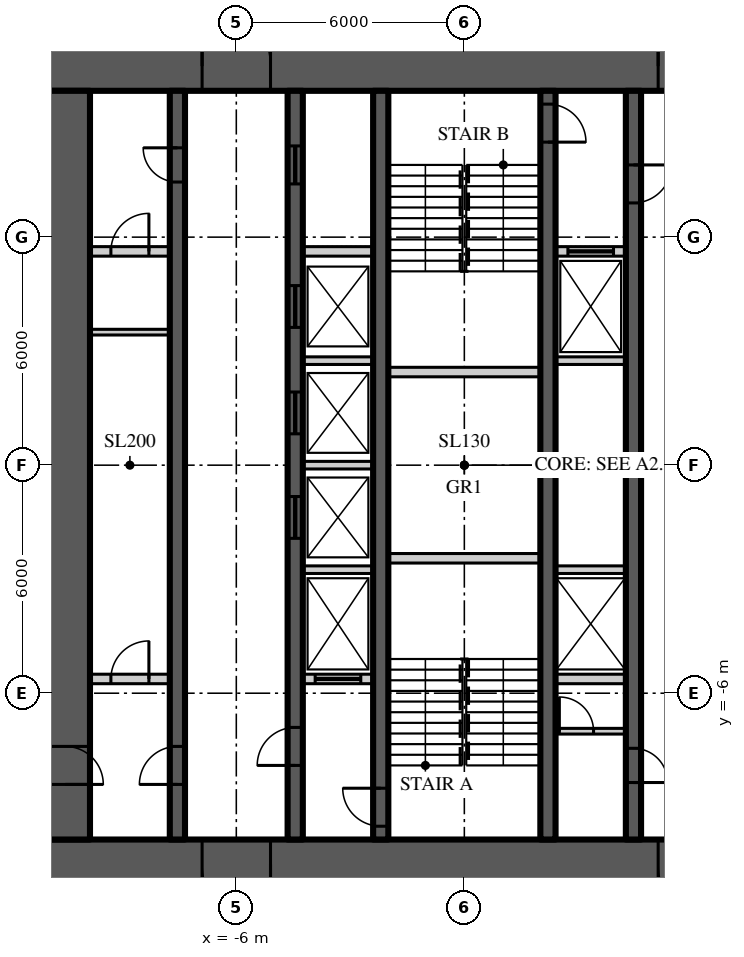
"""IFC4 building model, lengths in metres.
Left out: names, types, materials, properties, quantities, classifications, styles, units other than length and angle.
Written with IfcOpenShell. Run it as: python <this file> out.ifc"""

import sys

from ifc_helpers import new_model, si_unit, direction, frame, frame_2d, origin, place, context, subcontext, project, spatial, rectangle, extrude, element, fill, save


model = new_model("IFC4")
c1 = context("Model", 3, precision=1e-05, world=origin(), true_north=direction((0.0, 1.0)))
c2 = subcontext(c1, "Body", "Model", "MODEL_VIEW")
j1 = project(units=[si_unit("LENGTHUNIT", "METRE"), si_unit("PLANEANGLEUNIT", "RADIAN")], contexts=[c1])
p1 = place(None, origin())
s1 = spatial("IfcSite", under=j1, at=p1, CompositionType="ELEMENT")
p2 = place(p1, origin())
s2 = spatial("IfcBuilding", under=s1, at=p2, CompositionType="ELEMENT")
p3 = place(p2, frame((0.0, 0.0, 171.0)))
s3 = spatial("IfcBuildingStorey", under=s2, at=p3, CompositionType="ELEMENT", Elevation=171.0)
p4 = place(p3, frame((-11.15, 10.5, 0.0), z_axis=(0.0, 0.0, 1.0), x_axis=(1.0, 0.0, 0.0)))
e1 = element("IfcWall", 1, at=p4, inside=s3, PredefinedType="SHEAR", context=c2, shape_type="SweptSolid", body=[
    extrude(rectangle(XDim=22.3, YDim=1.3, at=frame_2d((11.15, 0.0))), origin(), (0.0, 0.0, 1.0), 3.9),
])
p5 = place(p4, frame((4.25, 0.0, 0.0)))
e2 = element("IfcOpeningElement", 2, at=p5, cuts=e1, PredefinedType="OPENING", context=c2, shape_type="SweptSolid", body=[
    extrude(rectangle(XDim=1.8, YDim=2.2, at=frame_2d((0.9, 1.1))), frame((0.0, 0.66, 0.0), z_axis=(0.0, -1.0, 0.0), x_axis=(1.0, 0.0, 0.0)), (0.0, 0.0, 1.0), 1.32),
])
p6 = place(p4, frame((16.25, 0.0, 0.0)))
e3 = element("IfcOpeningElement", 3, at=p6, cuts=e1, PredefinedType="OPENING", context=c2, shape_type="SweptSolid", body=[
    extrude(rectangle(XDim=1.8, YDim=2.2, at=frame_2d((0.9, 1.1))), frame((0.0, 0.66, 0.0), z_axis=(0.0, -1.0, 0.0), x_axis=(1.0, 0.0, 0.0)), (0.0, 0.0, 1.0), 1.32),
])
p7 = place(p3, frame((11.15, -10.5, 0.0), z_axis=(0.0, 0.0, 1.0), x_axis=(-1.0, 0.0, 0.0)))
e4 = element("IfcWall", 4, at=p7, inside=s3, PredefinedType="SHEAR", context=c2, shape_type="SweptSolid", body=[
    extrude(rectangle(XDim=22.3, YDim=1.3, at=frame_2d((11.15, 0.0))), origin(), (0.0, 0.0, 1.0), 3.9),
])
p8 = place(p7, frame((16.25, 0.0, 0.0)))
e5 = element("IfcOpeningElement", 5, at=p8, cuts=e4, PredefinedType="OPENING", context=c2, shape_type="SweptSolid", body=[
    extrude(rectangle(XDim=1.8, YDim=2.2, at=frame_2d((0.9, 1.1))), frame((0.0, 0.66, 0.0), z_axis=(0.0, -1.0, 0.0), x_axis=(1.0, 0.0, 0.0)), (0.0, 0.0, 1.0), 1.32),
])
p9 = place(p7, frame((4.25, 0.0, 0.0)))
e6 = element("IfcOpeningElement", 6, at=p9, cuts=e4, PredefinedType="OPENING", context=c2, shape_type="SweptSolid", body=[
    extrude(rectangle(XDim=1.8, YDim=2.2, at=frame_2d((0.9, 1.1))), frame((0.0, 0.66, 0.0), z_axis=(0.0, -1.0, 0.0), x_axis=(1.0, 0.0, 0.0)), (0.0, 0.0, 1.0), 1.32),
])
p10 = place(p3, frame((-10.5, 9.85, 0.0), z_axis=(0.0, 0.0, 1.0), x_axis=(0.0, -1.0, 0.0)))
e7 = element("IfcWall", 7, at=p10, inside=s3, PredefinedType="SHEAR", context=c2, shape_type="SweptSolid", body=[
    extrude(rectangle(XDim=19.7, YDim=1.3, at=frame_2d((9.85, 0.0))), origin(), (0.0, 0.0, 1.0), 3.9),
])
p11 = place(p10, frame((17.25, 0.0, 0.0)))
e8 = element("IfcOpeningElement", 8, at=p11, cuts=e7, PredefinedType="OPENING", context=c2, shape_type="SweptSolid", body=[
    extrude(rectangle(XDim=1.0, YDim=2.2, at=frame_2d((0.5, 1.1))), frame((0.0, 0.66, 0.0), z_axis=(0.0, -1.0, 0.0), x_axis=(1.0, 0.0, 0.0)), (0.0, 0.0, 1.0), 1.32),
])
p12 = place(p3, frame((-7.55, -9.85, 0.0), z_axis=(0.0, 0.0, 1.0), x_axis=(0.0, 1.0, 0.0)))
e9 = element("IfcWall", 9, at=p12, inside=s3, PredefinedType="SHEAR", context=c2, shape_type="SweptSolid", body=[
    extrude(rectangle(XDim=19.7, YDim=0.4, at=frame_2d((9.85, 0.0))), origin(), (0.0, 0.0, 1.0), 3.9),
])
p13 = place(p12, frame((1.45, 0.0, 0.0)))
e10 = element("IfcOpeningElement", 10, at=p13, cuts=e9, PredefinedType="OPENING", context=c2, shape_type="SweptSolid", body=[
    extrude(rectangle(XDim=1.0, YDim=2.2, at=frame_2d((0.5, 1.1))), frame((0.0, 0.21, 0.0), z_axis=(0.0, -1.0, 0.0), x_axis=(1.0, 0.0, 0.0)), (0.0, 0.0, 1.0), 0.42),
])
p14 = place(p12, frame((17.3, 0.0, 0.0)))
e11 = element("IfcOpeningElement", 11, at=p14, cuts=e9, PredefinedType="OPENING", context=c2, shape_type="SweptSolid", body=[
    extrude(rectangle(XDim=0.9, YDim=2.1, at=frame_2d((0.45, 1.05))), frame((0.0, 0.21, 0.0), z_axis=(0.0, -1.0, 0.0), x_axis=(1.0, 0.0, 0.0)), (0.0, 0.0, 1.0), 0.42),
])
p15 = place(p3, frame((-4.45, -9.85, 0.0), z_axis=(0.0, 0.0, 1.0), x_axis=(0.0, 1.0, 0.0)))
e12 = element("IfcWall", 12, at=p15, inside=s3, PredefinedType="SHEAR", context=c2, shape_type="SweptSolid", body=[
    extrude(rectangle(XDim=19.7, YDim=0.4, at=frame_2d((9.85, 0.0))), origin(), (0.0, 0.0, 1.0), 3.9),
])
p16 = place(p15, frame((1.95, 0.0, 0.0)))
e13 = element("IfcOpeningElement", 13, at=p16, cuts=e12, PredefinedType="OPENING", context=c2, shape_type="SweptSolid", body=[
    extrude(rectangle(XDim=1.0, YDim=2.2, at=frame_2d((0.5, 1.1))), frame((0.0, 0.21, 0.0), z_axis=(0.0, -1.0, 0.0), x_axis=(1.0, 0.0, 0.0)), (0.0, 0.0, 1.0), 0.42),
])
p17 = place(p15, frame((17.25, 0.0, 0.0)))
e14 = element("IfcOpeningElement", 14, at=p17, cuts=e12, PredefinedType="OPENING", context=c2, shape_type="SweptSolid", body=[
    extrude(rectangle(XDim=1.0, YDim=2.1, at=frame_2d((0.5, 1.05))), frame((0.0, 0.21, 0.0), z_axis=(0.0, -1.0, 0.0), x_axis=(1.0, 0.0, 0.0)), (0.0, 0.0, 1.0), 0.42),
])
p18 = place(p15, frame((7.925, 0.0, 0.0)))
e15 = element("IfcOpeningElement", 15, at=p18, cuts=e12, PredefinedType="OPENING", context=c2, shape_type="SweptSolid", body=[
    extrude(rectangle(XDim=1.1, YDim=2.2, at=frame_2d((0.55, 1.1))), frame((0.0, 0.21, 0.0), z_axis=(0.0, -1.0, 0.0), x_axis=(1.0, 0.0, 0.0)), (0.0, 0.0, 1.0), 0.42),
])
p19 = place(p15, frame((10.675, 0.0, 0.0)))
e16 = element("IfcOpeningElement", 16, at=p19, cuts=e12, PredefinedType="OPENING", context=c2, shape_type="SweptSolid", body=[
    extrude(rectangle(XDim=1.1, YDim=2.2, at=frame_2d((0.55, 1.1))), frame((0.0, 0.21, 0.0), z_axis=(0.0, -1.0, 0.0), x_axis=(1.0, 0.0, 0.0)), (0.0, 0.0, 1.0), 0.42),
])
p20 = place(p15, frame((13.475, 0.0, 0.0)))
e17 = element("IfcOpeningElement", 17, at=p20, cuts=e12, PredefinedType="OPENING", context=c2, shape_type="SweptSolid", body=[
    extrude(rectangle(XDim=1.1, YDim=2.2, at=frame_2d((0.55, 1.1))), frame((0.0, 0.21, 0.0), z_axis=(0.0, -1.0, 0.0), x_axis=(1.0, 0.0, 0.0)), (0.0, 0.0, 1.0), 0.42),
])
p21 = place(p3, frame((4.45, 9.85, 0.0), z_axis=(0.0, 0.0, 1.0), x_axis=(0.0, -1.0, 0.0)))
e18 = element("IfcWall", 18, at=p21, inside=s3, PredefinedType="SHEAR", context=c2, shape_type="SweptSolid", body=[
    extrude(rectangle(XDim=19.7, YDim=0.4, at=frame_2d((9.85, 0.0))), origin(), (0.0, 0.0, 1.0), 3.9),
])
p22 = place(p21, frame((1.95, 0.0, 0.0)))
e19 = element("IfcOpeningElement", 19, at=p22, cuts=e18, PredefinedType="OPENING", context=c2, shape_type="SweptSolid", body=[
    extrude(rectangle(XDim=1.0, YDim=2.2, at=frame_2d((0.5, 1.1))), frame((0.0, 0.21, 0.0), z_axis=(0.0, -1.0, 0.0), x_axis=(1.0, 0.0, 0.0)), (0.0, 0.0, 1.0), 0.42),
])
p23 = place(p21, frame((17.3, 0.0, 0.0)))
e20 = element("IfcOpeningElement", 20, at=p23, cuts=e18, PredefinedType="OPENING", context=c2, shape_type="SweptSolid", body=[
    extrude(rectangle(XDim=0.9, YDim=2.1, at=frame_2d((0.45, 1.05))), frame((0.0, 0.21, 0.0), z_axis=(0.0, -1.0, 0.0), x_axis=(1.0, 0.0, 0.0)), (0.0, 0.0, 1.0), 0.42),
])
p24 = place(p3, frame((-2.2, -9.85, 0.0), z_axis=(0.0, 0.0, 1.0), x_axis=(0.0, 1.0, 0.0)))
e21 = element("IfcWall", 21, at=p24, inside=s3, PredefinedType="SHEAR", context=c2, shape_type="SweptSolid", body=[
    extrude(rectangle(XDim=19.7, YDim=0.4, at=frame_2d((9.85, 0.0))), origin(), (0.0, 0.0, 1.0), 3.9),
])
p25 = place(p24, frame((0.35, 0.0, 0.0)))
e22 = element("IfcOpeningElement", 22, at=p25, cuts=e21, PredefinedType="OPENING", context=c2, shape_type="SweptSolid", body=[
    extrude(rectangle(XDim=1.0, YDim=2.2, at=frame_2d((0.5, 1.1))), frame((0.0, 0.21, 0.0), z_axis=(0.0, -1.0, 0.0), x_axis=(1.0, 0.0, 0.0)), (0.0, 0.0, 1.0), 0.42),
])
p26 = place(p3, frame((2.2, 9.85, 0.0), z_axis=(0.0, 0.0, 1.0), x_axis=(0.0, -1.0, 0.0)))
e23 = element("IfcWall", 23, at=p26, inside=s3, PredefinedType="SHEAR", context=c2, shape_type="SweptSolid", body=[
    extrude(rectangle(XDim=19.7, YDim=0.4, at=frame_2d((9.85, 0.0))), origin(), (0.0, 0.0, 1.0), 3.9),
])
p27 = place(p26, frame((0.35, 0.0, 0.0)))
e24 = element("IfcOpeningElement", 24, at=p27, cuts=e23, PredefinedType="OPENING", context=c2, shape_type="SweptSolid", body=[
    extrude(rectangle(XDim=1.0, YDim=2.2, at=frame_2d((0.5, 1.1))), frame((0.0, 0.21, 0.0), z_axis=(0.0, -1.0, 0.0), x_axis=(1.0, 0.0, 0.0)), (0.0, 0.0, 1.0), 0.42),
])
p28 = place(p3, frame((-9.85, 5.625, 0.0), z_axis=(0.0, 0.0, 1.0), x_axis=(1.0, 0.0, 0.0)))
e25 = element("IfcWall", 25, at=p28, inside=s3, PredefinedType="SOLIDWALL", context=c2, shape_type="SweptSolid", body=[
    extrude(rectangle(XDim=2.1, YDim=0.25, at=frame_2d((1.05, 0.0))), origin(), (0.0, 0.0, 1.0), 3.7),
])
p29 = place(p28, frame((0.55, 0.0, 0.0)))
e26 = element("IfcOpeningElement", 26, at=p29, cuts=e25, PredefinedType="OPENING", context=c2, shape_type="SweptSolid", body=[
    extrude(rectangle(XDim=1.0, YDim=2.2, at=frame_2d((0.5, 1.1))), frame((0.0, 0.135, 0.0), z_axis=(0.0, -1.0, 0.0), x_axis=(1.0, 0.0, 0.0)), (0.0, 0.0, 1.0), 0.27),
])
p30 = place(p3, frame((-4.25, 5.625, 0.0), z_axis=(0.0, 0.0, 1.0), x_axis=(1.0, 0.0, 0.0)))
e27 = element("IfcWall", 27, at=p30, inside=s3, PredefinedType="SOLIDWALL", context=c2, shape_type="SweptSolid", body=[
    extrude(rectangle(XDim=1.85, YDim=0.25, at=frame_2d((0.925, 0.0))), origin(), (0.0, 0.0, 1.0), 3.7),
])
p31 = place(p3, frame((2.4, 5.625, 0.0), z_axis=(0.0, 0.0, 1.0), x_axis=(1.0, 0.0, 0.0)))
e28 = element("IfcWall", 28, at=p31, inside=s3, PredefinedType="SOLIDWALL", context=c2, shape_type="SweptSolid", body=[
    extrude(rectangle(XDim=1.85, YDim=0.25, at=frame_2d((0.925, 0.0))), origin(), (0.0, 0.0, 1.0), 3.7),
])
p32 = place(p31, frame((0.325, 0.0, 0.0)))
e29 = element("IfcOpeningElement", 29, at=p32, cuts=e28, PredefinedType="OPENING", context=c2, shape_type="SweptSolid", body=[
    extrude(rectangle(XDim=1.2, YDim=2.2, at=frame_2d((0.6, 1.1))), frame((0.0, 0.135, 0.0), z_axis=(0.0, -1.0, 0.0), x_axis=(1.0, 0.0, 0.0)), (0.0, 0.0, 1.0), 0.27),
])
p33 = place(p3, frame((-9.85, -5.625, 0.0), z_axis=(0.0, 0.0, 1.0), x_axis=(1.0, 0.0, 0.0)))
e30 = element("IfcWall", 30, at=p33, inside=s3, PredefinedType="SOLIDWALL", context=c2, shape_type="SweptSolid", body=[
    extrude(rectangle(XDim=2.1, YDim=0.25, at=frame_2d((1.05, 0.0))), origin(), (0.0, 0.0, 1.0), 3.7),
])
p34 = place(p33, frame((0.55, 0.0, 0.0)))
e31 = element("IfcOpeningElement", 31, at=p34, cuts=e30, PredefinedType="OPENING", context=c2, shape_type="SweptSolid", body=[
    extrude(rectangle(XDim=1.0, YDim=2.2, at=frame_2d((0.5, 1.1))), frame((0.0, 0.135, 0.0), z_axis=(0.0, -1.0, 0.0), x_axis=(1.0, 0.0, 0.0)), (0.0, 0.0, 1.0), 0.27),
])
p35 = place(p3, frame((-4.25, -5.625, 0.0), z_axis=(0.0, 0.0, 1.0), x_axis=(1.0, 0.0, 0.0)))
e32 = element("IfcWall", 32, at=p35, inside=s3, PredefinedType="SOLIDWALL", context=c2, shape_type="SweptSolid", body=[
    extrude(rectangle(XDim=1.85, YDim=0.25, at=frame_2d((0.925, 0.0))), origin(), (0.0, 0.0, 1.0), 3.7),
])
p36 = place(p35, frame((0.325, 0.0, 0.0)))
e33 = element("IfcOpeningElement", 33, at=p36, cuts=e32, PredefinedType="OPENING", context=c2, shape_type="SweptSolid", body=[
    extrude(rectangle(XDim=1.2, YDim=2.2, at=frame_2d((0.6, 1.1))), frame((0.0, 0.135, 0.0), z_axis=(0.0, -1.0, 0.0), x_axis=(1.0, 0.0, 0.0)), (0.0, 0.0, 1.0), 0.27),
])
p37 = place(p3, frame((2.4, -5.625, 0.0), z_axis=(0.0, 0.0, 1.0), x_axis=(1.0, 0.0, 0.0)))
e34 = element("IfcWall", 34, at=p37, inside=s3, PredefinedType="SOLIDWALL", context=c2, shape_type="SweptSolid", body=[
    extrude(rectangle(XDim=1.85, YDim=0.25, at=frame_2d((0.925, 0.0))), origin(), (0.0, 0.0, 1.0), 3.7),
])
for number, where, z_axis, x_axis in (
    (35, (-2.0, -2.45, 0.0), (0.0, 0.0, 1.0), (1.0, 0.0, 0.0)),
    (36, (-2.0, 2.45, 0.0), (0.0, 0.0, 1.0), (1.0, 0.0, 0.0)),
):
    element("IfcWall", number, at=place(p3, frame(where, z_axis=z_axis, x_axis=x_axis)), inside=s3, PredefinedType="SOLIDWALL", context=c2, shape_type="SweptSolid", body=[
        extrude(rectangle(XDim=4.0, YDim=0.25, at=frame_2d((2.0, 0.0))), origin(), (0.0, 0.0, 1.0), 3.7),
    ])
for number, where, z_axis, x_axis in (
    (37, (-4.25, -2.75, 0.0), (0.0, 0.0, 1.0), (1.0, 0.0, 0.0)),
    (38, (2.4, -2.75, 0.0), (0.0, 0.0, 1.0), (1.0, 0.0, 0.0)),
    (39, (-4.25, 0.0, 0.0), (0.0, 0.0, 1.0), (1.0, 0.0, 0.0)),
    (40, (-4.25, 2.75, 0.0), (0.0, 0.0, 1.0), (1.0, 0.0, 0.0)),
    (41, (2.4, 2.75, 0.0), (0.0, 0.0, 1.0), (1.0, 0.0, 0.0)),
):
    element("IfcWall", number, at=place(p3, frame(where, z_axis=z_axis, x_axis=x_axis)), inside=s3, PredefinedType="SOLIDWALL", context=c2, shape_type="SweptSolid", body=[
        extrude(rectangle(XDim=1.85, YDim=0.2, at=frame_2d((0.925, 0.0))), origin(), (0.0, 0.0, 1.0), 3.7),
    ])
p38 = place(p3, frame((-9.85, 3.5, 0.0), z_axis=(0.0, 0.0, 1.0), x_axis=(1.0, 0.0, 0.0)))
e42 = element("IfcWall", 42, at=p38, inside=s3, PredefinedType="SOLIDWALL", context=c2, shape_type="SweptSolid", body=[
    extrude(rectangle(XDim=2.1, YDim=0.15, at=frame_2d((1.05, 0.0))), origin(), (0.0, 0.0, 1.0), 3.77),
])
p39 = place(p3, frame((2.4, -7.0, 0.0), z_axis=(0.0, 0.0, 1.0), x_axis=(1.0, 0.0, 0.0)))
e43 = element("IfcWall", 43, at=p39, inside=s3, PredefinedType="SOLIDWALL", context=c2, shape_type="SweptSolid", body=[
    extrude(rectangle(XDim=1.85, YDim=0.15, at=frame_2d((0.925, 0.0))), origin(), (0.0, 0.0, 1.0), 3.77),
])
p40 = place(p39, frame((0.1, 0.0, 0.0)))
e44 = element("IfcOpeningElement", 44, at=p40, cuts=e43, PredefinedType="OPENING", context=c2, shape_type="SweptSolid", body=[
    extrude(rectangle(XDim=0.9, YDim=2.1, at=frame_2d((0.45, 1.05))), frame((0.0, 0.085, 0.0), z_axis=(0.0, -1.0, 0.0), x_axis=(1.0, 0.0, 0.0)), (0.0, 0.0, 1.0), 0.17),
])
p41 = place(p5, origin())
e45 = element("IfcDoor", 45, at=p41, inside=s3, OperationType="DOUBLE_DOOR_DOUBLE_SWING", PredefinedType="DOOR", context=c2, shape_type="SweptSolid", body=[
    extrude(rectangle(XDim=1.8, YDim=2.2, at=frame_2d((0.9, 1.1))), frame((0.0, 0.025, 0.0), z_axis=(0.0, -1.0, 0.0), x_axis=(1.0, 0.0, 0.0)), (0.0, 0.0, 1.0), 0.05),
])
fill(e2, e45)
p42 = place(p8, origin())
e46 = element("IfcDoor", 46, at=p42, inside=s3, OperationType="DOUBLE_DOOR_DOUBLE_SWING", PredefinedType="DOOR", context=c2, shape_type="SweptSolid", body=[
    extrude(rectangle(XDim=1.8, YDim=2.2, at=frame_2d((0.9, 1.1))), frame((0.0, 0.025, 0.0), z_axis=(0.0, -1.0, 0.0), x_axis=(1.0, 0.0, 0.0)), (0.0, 0.0, 1.0), 0.05),
])
fill(e5, e46)
p43 = place(p6, origin())
e47 = element("IfcDoor", 47, at=p43, inside=s3, OperationType="DOUBLE_DOOR_DOUBLE_SWING", PredefinedType="DOOR", context=c2, shape_type="SweptSolid", body=[
    extrude(rectangle(XDim=1.8, YDim=2.2, at=frame_2d((0.9, 1.1))), frame((0.0, 0.025, 0.0), z_axis=(0.0, -1.0, 0.0), x_axis=(1.0, 0.0, 0.0)), (0.0, 0.0, 1.0), 0.05),
])
fill(e3, e47)
p44 = place(p9, origin())
e48 = element("IfcDoor", 48, at=p44, inside=s3, OperationType="DOUBLE_DOOR_DOUBLE_SWING", PredefinedType="DOOR", context=c2, shape_type="SweptSolid", body=[
    extrude(rectangle(XDim=1.8, YDim=2.2, at=frame_2d((0.9, 1.1))), frame((0.0, 0.025, 0.0), z_axis=(0.0, -1.0, 0.0), x_axis=(1.0, 0.0, 0.0)), (0.0, 0.0, 1.0), 0.05),
])
fill(e6, e48)
p45 = place(p13, origin())
e49 = element("IfcDoor", 49, at=p45, inside=s3, OperationType="SINGLE_SWING_LEFT", PredefinedType="DOOR", context=c2, shape_type="SweptSolid", body=[
    extrude(rectangle(XDim=1.0, YDim=2.2, at=frame_2d((0.5, 1.1))), frame((0.0, 0.025, 0.0), z_axis=(0.0, -1.0, 0.0), x_axis=(1.0, 0.0, 0.0)), (0.0, 0.0, 1.0), 0.05),
])
fill(e10, e49)
p46 = place(p11, origin())
e50 = element("IfcDoor", 50, at=p46, inside=s3, OperationType="SINGLE_SWING_RIGHT", PredefinedType="DOOR", context=c2, shape_type="SweptSolid", body=[
    extrude(rectangle(XDim=1.0, YDim=2.2, at=frame_2d((0.5, 1.1))), frame((0.0, 0.025, 0.0), z_axis=(0.0, -1.0, 0.0), x_axis=(1.0, 0.0, 0.0)), (0.0, 0.0, 1.0), 0.05),
])
fill(e8, e50)
p47 = place(p16, origin())
e51 = element("IfcDoor", 51, at=p47, inside=s3, OperationType="SINGLE_SWING_LEFT", PredefinedType="DOOR", context=c2, shape_type="SweptSolid", body=[
    extrude(rectangle(XDim=1.0, YDim=2.2, at=frame_2d((0.5, 1.1))), frame((0.0, 0.025, 0.0), z_axis=(0.0, -1.0, 0.0), x_axis=(1.0, 0.0, 0.0)), (0.0, 0.0, 1.0), 0.05),
])
fill(e13, e51)
p48 = place(p25, origin())
e52 = element("IfcDoor", 52, at=p48, inside=s3, OperationType="SINGLE_SWING_RIGHT", PredefinedType="DOOR", context=c2, shape_type="SweptSolid", body=[
    extrude(rectangle(XDim=1.0, YDim=2.2, at=frame_2d((0.5, 1.1))), frame((0.0, 0.025, 0.0), z_axis=(0.0, -1.0, 0.0), x_axis=(1.0, 0.0, 0.0)), (0.0, 0.0, 1.0), 0.05),
])
fill(e22, e52)
p49 = place(p22, origin())
e53 = element("IfcDoor", 53, at=p49, inside=s3, OperationType="SINGLE_SWING_LEFT", PredefinedType="DOOR", context=c2, shape_type="SweptSolid", body=[
    extrude(rectangle(XDim=1.0, YDim=2.2, at=frame_2d((0.5, 1.1))), frame((0.0, 0.025, 0.0), z_axis=(0.0, -1.0, 0.0), x_axis=(1.0, 0.0, 0.0)), (0.0, 0.0, 1.0), 0.05),
])
fill(e19, e53)
p50 = place(p27, origin())
e54 = element("IfcDoor", 54, at=p50, inside=s3, OperationType="SINGLE_SWING_RIGHT", PredefinedType="DOOR", context=c2, shape_type="SweptSolid", body=[
    extrude(rectangle(XDim=1.0, YDim=2.2, at=frame_2d((0.5, 1.1))), frame((0.0, 0.025, 0.0), z_axis=(0.0, -1.0, 0.0), x_axis=(1.0, 0.0, 0.0)), (0.0, 0.0, 1.0), 0.05),
])
fill(e24, e54)
p51 = place(p14, origin())
e55 = element("IfcDoor", 55, at=p51, inside=s3, OperationType="SINGLE_SWING_RIGHT", PredefinedType="DOOR", context=c2, shape_type="SweptSolid", body=[
    extrude(rectangle(XDim=0.9, YDim=2.1, at=frame_2d((0.45, 1.05))), frame((0.0, 0.025, 0.0), z_axis=(0.0, -1.0, 0.0), x_axis=(1.0, 0.0, 0.0)), (0.0, 0.0, 1.0), 0.05),
])
fill(e11, e55)
p52 = place(p17, origin())
e56 = element("IfcDoor", 56, at=p52, inside=s3, OperationType="SLIDING_TO_LEFT", PredefinedType="DOOR", context=c2, shape_type="SweptSolid", body=[
    extrude(rectangle(XDim=1.0, YDim=2.1, at=frame_2d((0.5, 1.05))), frame((0.0, 0.025, 0.0), z_axis=(0.0, -1.0, 0.0), x_axis=(1.0, 0.0, 0.0)), (0.0, 0.0, 1.0), 0.05),
])
fill(e14, e56)
p53 = place(p23, origin())
e57 = element("IfcDoor", 57, at=p53, inside=s3, OperationType="SINGLE_SWING_RIGHT", PredefinedType="DOOR", context=c2, shape_type="SweptSolid", body=[
    extrude(rectangle(XDim=0.9, YDim=2.1, at=frame_2d((0.45, 1.05))), frame((0.0, 0.025, 0.0), z_axis=(0.0, -1.0, 0.0), x_axis=(1.0, 0.0, 0.0)), (0.0, 0.0, 1.0), 0.05),
])
fill(e20, e57)
p54 = place(p18, origin())
e58 = element("IfcDoor", 58, at=p54, inside=s3, OperationType="SLIDING_TO_LEFT", PredefinedType="DOOR", context=c2, shape_type="SweptSolid", body=[
    extrude(rectangle(XDim=1.1, YDim=2.2, at=frame_2d((0.55, 1.1))), frame((0.0, 0.025, 0.0), z_axis=(0.0, -1.0, 0.0), x_axis=(1.0, 0.0, 0.0)), (0.0, 0.0, 1.0), 0.05),
])
fill(e15, e58)
p55 = place(p19, origin())
e59 = element("IfcDoor", 59, at=p55, inside=s3, OperationType="SLIDING_TO_LEFT", PredefinedType="DOOR", context=c2, shape_type="SweptSolid", body=[
    extrude(rectangle(XDim=1.1, YDim=2.2, at=frame_2d((0.55, 1.1))), frame((0.0, 0.025, 0.0), z_axis=(0.0, -1.0, 0.0), x_axis=(1.0, 0.0, 0.0)), (0.0, 0.0, 1.0), 0.05),
])
fill(e16, e59)
p56 = place(p20, origin())
e60 = element("IfcDoor", 60, at=p56, inside=s3, OperationType="SLIDING_TO_LEFT", PredefinedType="DOOR", context=c2, shape_type="SweptSolid", body=[
    extrude(rectangle(XDim=1.1, YDim=2.2, at=frame_2d((0.55, 1.1))), frame((0.0, 0.025, 0.0), z_axis=(0.0, -1.0, 0.0), x_axis=(1.0, 0.0, 0.0)), (0.0, 0.0, 1.0), 0.05),
])
fill(e17, e60)
p57 = place(p36, origin())
e61 = element("IfcDoor", 61, at=p57, inside=s3, OperationType="SLIDING_TO_LEFT", PredefinedType="DOOR", context=c2, shape_type="SweptSolid", body=[
    extrude(rectangle(XDim=1.2, YDim=2.2, at=frame_2d((0.6, 1.1))), frame((0.0, 0.025, 0.0), z_axis=(0.0, -1.0, 0.0), x_axis=(1.0, 0.0, 0.0)), (0.0, 0.0, 1.0), 0.05),
])
fill(e33, e61)
p58 = place(p32, origin())
e62 = element("IfcDoor", 62, at=p58, inside=s3, OperationType="SLIDING_TO_LEFT", PredefinedType="DOOR", context=c2, shape_type="SweptSolid", body=[
    extrude(rectangle(XDim=1.2, YDim=2.2, at=frame_2d((0.6, 1.1))), frame((0.0, 0.025, 0.0), z_axis=(0.0, -1.0, 0.0), x_axis=(1.0, 0.0, 0.0)), (0.0, 0.0, 1.0), 0.05),
])
fill(e29, e62)
p59 = place(p29, origin())
e63 = element("IfcDoor", 63, at=p59, inside=s3, OperationType="SINGLE_SWING_RIGHT", PredefinedType="DOOR", context=c2, shape_type="SweptSolid", body=[
    extrude(rectangle(XDim=1.0, YDim=2.2, at=frame_2d((0.5, 1.1))), frame((0.0, 0.025, 0.0), z_axis=(0.0, -1.0, 0.0), x_axis=(1.0, 0.0, 0.0)), (0.0, 0.0, 1.0), 0.05),
])
fill(e26, e63)
p60 = place(p34, origin())
e64 = element("IfcDoor", 64, at=p60, inside=s3, OperationType="SINGLE_SWING_RIGHT", PredefinedType="DOOR", context=c2, shape_type="SweptSolid", body=[
    extrude(rectangle(XDim=1.0, YDim=2.2, at=frame_2d((0.5, 1.1))), frame((0.0, 0.025, 0.0), z_axis=(0.0, -1.0, 0.0), x_axis=(1.0, 0.0, 0.0)), (0.0, 0.0, 1.0), 0.05),
])
fill(e31, e64)
p61 = place(p40, origin())
e65 = element("IfcDoor", 65, at=p61, inside=s3, OperationType="SINGLE_SWING_LEFT", PredefinedType="DOOR", context=c2, shape_type="SweptSolid", body=[
    extrude(rectangle(XDim=0.9, YDim=2.1, at=frame_2d((0.45, 1.05))), frame((0.0, 0.025, 0.0), z_axis=(0.0, -1.0, 0.0), x_axis=(1.0, 0.0, 0.0)), (0.0, 0.0, 1.0), 0.05),
])
fill(e44, e65)
save(model, sys.argv[1])
